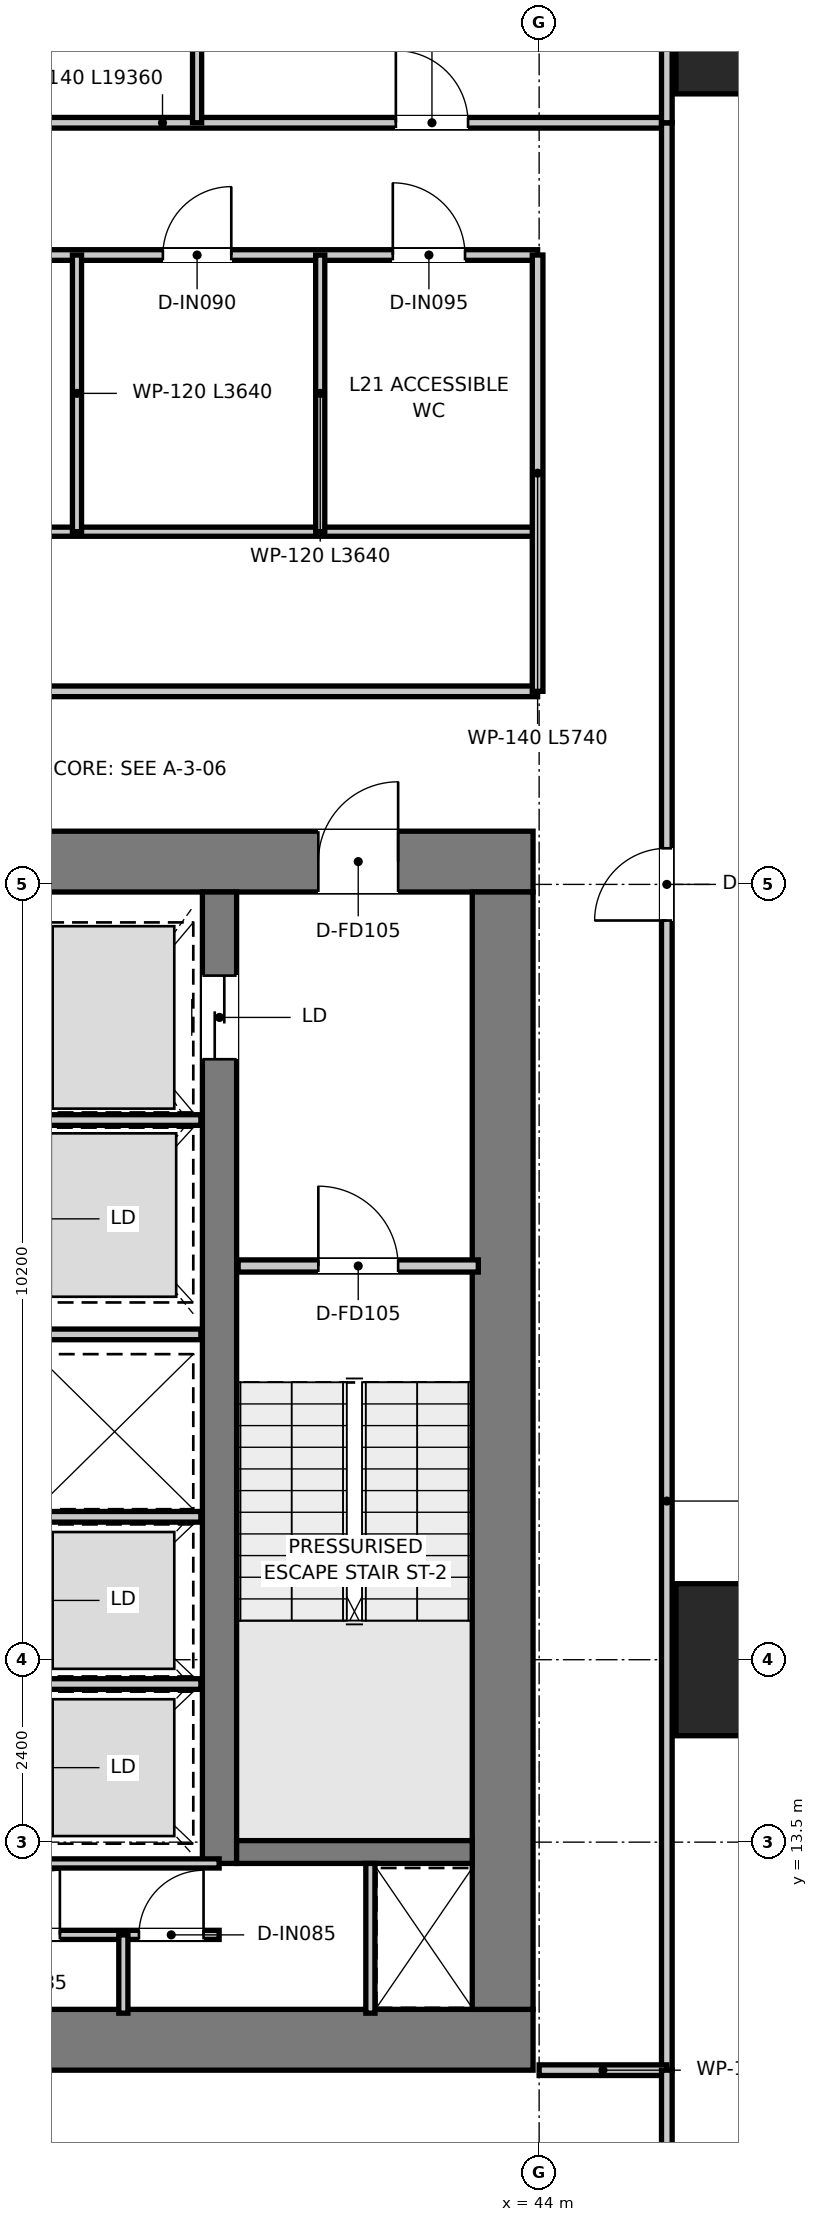
"""IFC4 building model, lengths in metres.
Left out: names, types, materials, properties, quantities, classifications, styles, units other than length and angle.
Written with IfcOpenShell. Run it as: python <this file> out.ifc"""

import sys

from ifc_helpers import new_model, si_unit, direction, frame, frame_2d, origin, origin_2d, place, context, subcontext, project, spatial, rectangle, extrude, source, transform, mapped, element, fill, save


model = new_model("IFC4")
c1 = context("Model", 3, precision=1e-05, world=origin(), true_north=direction((0.0, 1.0)))
c2 = subcontext(c1, "Body", "Model", "MODEL_VIEW")
j1 = project(units=[si_unit("LENGTHUNIT", "METRE"), si_unit("PLANEANGLEUNIT", "RADIAN")], contexts=[c1])
p1 = place(None, origin())
s1 = spatial("IfcSite", under=j1, at=p1, CompositionType="ELEMENT")
p2 = place(p1, origin())
s2 = spatial("IfcBuilding", under=s1, at=p2, CompositionType="ELEMENT")
p3 = place(p2, frame((0.0, 0.0, 90.05)))
s3 = spatial("IfcBuildingStorey", under=s2, at=p3, CompositionType="ELEMENT", Elevation=90.05)
p4 = place(p3, frame((28.08, 10.9, 0.0), z_axis=(0.0, 0.0, 1.0), x_axis=(1.0, 0.0, 0.0)))
e1 = element("IfcWall", 1, at=p4, inside=s3, PredefinedType="SHEAR", context=c2, shape_type="SweptSolid", body=[
    extrude(rectangle(XDim=15.84, YDim=0.8, at=frame_2d((7.92, 0.0))), origin(), (0.0, 0.0, 1.0), 3.95),
])
p5 = place(p3, frame((28.08, 26.4, 0.0), z_axis=(0.0, 0.0, 1.0), x_axis=(1.0, 0.0, 0.0)))
e2 = element("IfcWall", 2, at=p5, inside=s3, PredefinedType="SHEAR", context=c2, shape_type="SweptSolid", body=[
    extrude(rectangle(XDim=15.84, YDim=0.8, at=frame_2d((7.92, 0.0))), origin(), (0.0, 0.0, 1.0), 3.95),
])
p6 = place(p5, frame((7.22, 0.0, 0.0)))
e3 = element("IfcOpeningElement", 3, at=p6, cuts=e2, PredefinedType="OPENING", context=c2, shape_type="SweptSolid", body=[
    extrude(rectangle(XDim=1.4, YDim=2.2, at=frame_2d((0.7, 1.1))), frame((0.0, 0.41, 0.0), z_axis=(0.0, -1.0, 0.0), x_axis=(1.0, 0.0, 0.0)), (0.0, 0.0, 1.0), 0.82),
])
p7 = place(p5, frame((1.775, 0.0, 0.0)))
e4 = element("IfcOpeningElement", 4, at=p7, cuts=e2, PredefinedType="OPENING", context=c2, shape_type="SweptSolid", body=[
    extrude(rectangle(XDim=1.05, YDim=2.1, at=frame_2d((0.525, 1.05))), frame((0.0, 0.41, 0.0), z_axis=(0.0, -1.0, 0.0), x_axis=(1.0, 0.0, 0.0)), (0.0, 0.0, 1.0), 0.82),
])
p8 = place(p5, frame((13.015, 0.0, 0.0)))
e5 = element("IfcOpeningElement", 5, at=p8, cuts=e2, PredefinedType="OPENING", context=c2, shape_type="SweptSolid", body=[
    extrude(rectangle(XDim=1.05, YDim=2.1, at=frame_2d((0.525, 1.05))), frame((0.0, 0.41, 0.0), z_axis=(0.0, -1.0, 0.0), x_axis=(1.0, 0.0, 0.0)), (0.0, 0.0, 1.0), 0.82),
])
p9 = place(p3, frame((43.52, 11.3, 0.0), z_axis=(0.0, 0.0, 1.0), x_axis=(0.0, 1.0, 0.0)))
e6 = element("IfcWall", 6, at=p9, inside=s3, PredefinedType="SHEAR", context=c2, shape_type="SweptSolid", body=[
    extrude(rectangle(XDim=14.7, YDim=0.8, at=frame_2d((7.35, 0.0))), origin(), (0.0, 0.0, 1.0), 3.95),
])
p10 = place(p3, frame((39.795, 13.22, 0.0), z_axis=(0.0, 0.0, 1.0), x_axis=(0.0, 1.0, 0.0)))
e7 = element("IfcWall", 7, at=p10, inside=s3, PredefinedType="SHEAR", context=c2, shape_type="SweptSolid", body=[
    extrude(rectangle(XDim=12.78, YDim=0.45, at=frame_2d((6.39, 0.0))), origin(), (0.0, 0.0, 1.0), 3.95),
])
p11 = place(p10, frame((10.58, 0.0, 0.0)))
e8 = element("IfcOpeningElement", 8, at=p11, cuts=e7, PredefinedType="OPENING", context=c2, shape_type="SweptSolid", body=[
    extrude(rectangle(XDim=1.1, YDim=2.15, at=frame_2d((0.55, 1.075))), frame((0.0, 0.235, 0.0), z_axis=(0.0, -1.0, 0.0), x_axis=(1.0, 0.0, 0.0)), (0.0, 0.0, 1.0), 0.47),
])
p12 = place(p3, frame((40.02, 13.37, 0.0), z_axis=(0.0, 0.0, 1.0), x_axis=(1.0, 0.0, 0.0)))
e9 = element("IfcWall", 9, at=p12, inside=s3, PredefinedType="SHEAR", context=c2, shape_type="SweptSolid", body=[
    extrude(rectangle(XDim=3.1, YDim=0.3, at=frame_2d((1.55, 0.0))), origin(), (0.0, 0.0, 1.0), 3.95),
])
m1 = source(origin(), c2, "Body", "SweptSolid", [
    extrude(rectangle(XDim=2.0, YDim=2.0, at=origin_2d()), origin(), (0.0, 0.0, 1.0), 3.95),
])
for number, where, z_axis, x_axis in (
    (10, (46.8, 15.9, 0.0), (0.0, 0.0, 1.0), (1.0, 0.0, 0.0)),
    (11, (46.8, 37.5, 0.0), (0.0, 0.0, 1.0), (1.0, 0.0, 0.0)),
):
    element("IfcColumn", number, at=place(p3, frame(where, z_axis=z_axis, x_axis=x_axis)), inside=s3, PredefinedType="USERDEFINED", context=c2, shape_type="MappedRepresentation", body=[
        mapped(m1, transform((0.0, 0.0, 0.0), x_axis=(1.0, 0.0, 0.0), y_axis=(0.0, 1.0, 0.0), z_axis=(0.0, 0.0, 1.0), scale=1.0)),
    ])
p13 = place(p3, frame((40.04, 21.08, 0.0), z_axis=(0.0, 0.0, 1.0), x_axis=(1.0, 0.0, 0.0)))
e12 = element("IfcWall", 12, at=p13, inside=s3, PredefinedType="PARTITIONING", context=c2, shape_type="SweptSolid", body=[
    extrude(rectangle(XDim=3.16, YDim=0.16, at=frame_2d((1.58, 0.0))), origin(), (0.0, 0.0, 1.0), 3.67),
])
p14 = place(p13, frame((1.055, 0.0, 0.0)))
e13 = element("IfcOpeningElement", 13, at=p14, cuts=e12, PredefinedType="OPENING", context=c2, shape_type="SweptSolid", body=[
    extrude(rectangle(XDim=1.05, YDim=2.1, at=frame_2d((0.525, 1.05))), frame((0.0, 0.09, 0.0), z_axis=(0.0, -1.0, 0.0), x_axis=(1.0, 0.0, 0.0)), (0.0, 0.0, 1.0), 0.18),
])
p15 = place(p3, frame((37.28, 23.0, 0.0), z_axis=(0.0, 0.0, 1.0), x_axis=(1.0, 0.0, 0.0)))
e14 = element("IfcWall", 14, at=p15, inside=s3, PredefinedType="PARTITIONING", context=c2, shape_type="SweptSolid", body=[
    extrude(rectangle(XDim=2.27, YDim=0.14, at=frame_2d((1.135, 0.0))), origin(), (0.0, 0.0, 1.0), 2.47),
])
for number, where, z_axis, x_axis in (
    (15, (37.28, 17.78, 0.0), (0.0, 0.0, 1.0), (1.0, 0.0, 0.0)),
    (16, (37.28, 20.18, 0.0), (0.0, 0.0, 1.0), (1.0, 0.0, 0.0)),
    (17, (37.28, 15.58, 0.0), (0.0, 0.0, 1.0), (1.0, 0.0, 0.0)),
):
    element("IfcWall", number, at=place(p3, frame(where, z_axis=z_axis, x_axis=x_axis)), inside=s3, PredefinedType="PARTITIONING", context=c2, shape_type="SweptSolid", body=[
        extrude(rectangle(XDim=2.27, YDim=0.14, at=frame_2d((1.135, 0.0))), origin(), (0.0, 0.0, 1.0), 3.67),
    ])
p16 = place(p3, frame((41.78, 11.25, 0.0), z_axis=(0.0, 0.0, 1.0), x_axis=(0.0, 1.0, 0.0)))
e18 = element("IfcWall", 18, at=p16, inside=s3, PredefinedType="PARTITIONING", context=c2, shape_type="SweptSolid", body=[
    extrude(rectangle(XDim=1.97, YDim=0.12, at=frame_2d((0.985, 0.0))), origin(), (0.0, 0.0, 1.0), 3.67),
])
p17 = place(p3, frame((32.21, 13.22, 0.0), z_axis=(0.0, 0.0, 1.0), x_axis=(1.0, 0.0, 0.0)))
e19 = element("IfcWall", 19, at=p17, inside=s3, PredefinedType="PARTITIONING", context=c2, shape_type="SweptSolid", body=[
    extrude(rectangle(XDim=7.58, YDim=0.12, at=frame_2d((3.79, 0.0))), origin(), (0.0, 0.0, 1.0), 3.67),
])
p18 = place(p17, frame((3.365, 0.0, 0.0)))
e20 = element("IfcOpeningElement", 20, at=p18, cuts=e19, PredefinedType="OPENING", context=c2, shape_type="SweptSolid", body=[
    extrude(rectangle(XDim=0.85, YDim=2.1, at=frame_2d((0.425, 1.05))), frame((0.0, 0.07, 0.0), z_axis=(0.0, -1.0, 0.0), x_axis=(1.0, 0.0, 0.0)), (0.0, 0.0, 1.0), 0.14),
])
p19 = place(p3, frame((32.21, 12.28, 0.0), z_axis=(0.0, 0.0, 1.0), x_axis=(1.0, 0.0, 0.0)))
e21 = element("IfcWall", 21, at=p19, inside=s3, PredefinedType="PARTITIONING", context=c2, shape_type="SweptSolid", body=[
    extrude(rectangle(XDim=7.58, YDim=0.12, at=frame_2d((3.79, 0.0))), origin(), (0.0, 0.0, 1.0), 3.67),
])
p20 = place(p19, frame((0.205, 0.0, 0.0)))
e22 = element("IfcOpeningElement", 22, at=p20, cuts=e21, PredefinedType="OPENING", context=c2, shape_type="SweptSolid", body=[
    extrude(rectangle(XDim=0.85, YDim=2.1, at=frame_2d((0.425, 1.05))), frame((0.0, 0.07, 0.0), z_axis=(0.0, -1.0, 0.0), x_axis=(1.0, 0.0, 0.0)), (0.0, 0.0, 1.0), 0.14),
])
p21 = place(p19, frame((2.095, 0.0, 0.0)))
e23 = element("IfcOpeningElement", 23, at=p21, cuts=e21, PredefinedType="OPENING", context=c2, shape_type="SweptSolid", body=[
    extrude(rectangle(XDim=0.85, YDim=2.1, at=frame_2d((0.425, 1.05))), frame((0.0, 0.07, 0.0), z_axis=(0.0, -1.0, 0.0), x_axis=(1.0, 0.0, 0.0)), (0.0, 0.0, 1.0), 0.14),
])
p22 = place(p19, frame((4.635, 0.0, 0.0)))
e24 = element("IfcOpeningElement", 24, at=p22, cuts=e21, PredefinedType="OPENING", context=c2, shape_type="SweptSolid", body=[
    extrude(rectangle(XDim=0.85, YDim=2.1, at=frame_2d((0.425, 1.05))), frame((0.0, 0.07, 0.0), z_axis=(0.0, -1.0, 0.0), x_axis=(1.0, 0.0, 0.0)), (0.0, 0.0, 1.0), 0.14),
])
p23 = place(p19, frame((6.525, 0.0, 0.0)))
e25 = element("IfcOpeningElement", 25, at=p23, cuts=e21, PredefinedType="OPENING", context=c2, shape_type="SweptSolid", body=[
    extrude(rectangle(XDim=0.85, YDim=2.1, at=frame_2d((0.425, 1.05))), frame((0.0, 0.07, 0.0), z_axis=(0.0, -1.0, 0.0), x_axis=(1.0, 0.0, 0.0)), (0.0, 0.0, 1.0), 0.14),
])
p24 = place(p3, frame((38.53, 11.25, 0.0), z_axis=(0.0, 0.0, 1.0), x_axis=(0.0, 1.0, 0.0)))
e26 = element("IfcWall", 26, at=p24, inside=s3, PredefinedType="PARTITIONING", context=c2, shape_type="SweptSolid", body=[
    extrude(rectangle(XDim=1.03, YDim=0.12, at=frame_2d((0.515, 0.0))), origin(), (0.0, 0.0, 1.0), 3.67),
])
p25 = place(p3, frame((28.02, 28.64, 0.0), z_axis=(0.0, 0.0, 1.0), x_axis=(1.0, 0.0, 0.0)))
e27 = element("IfcWall", 27, at=p25, inside=s3, PredefinedType="PARTITIONING", context=c2, shape_type="SweptSolid", body=[
    extrude(rectangle(XDim=15.96, YDim=0.14, at=frame_2d((7.98, 0.0))), origin(), (0.0, 0.0, 1.0), 3.08),
])
p26 = place(p25, frame((7.455, 0.0, 0.0)))
e28 = element("IfcOpeningElement", 28, at=p26, cuts=e27, PredefinedType="OPENING", context=c2, shape_type="SweptSolid", body=[
    extrude(rectangle(XDim=1.05, YDim=2.15, at=frame_2d((0.525, 1.075))), frame((0.0, 0.08, 0.0), z_axis=(0.0, -1.0, 0.0), x_axis=(1.0, 0.0, 0.0)), (0.0, 0.0, 1.0), 0.16),
])
p27 = place(p3, frame((28.02, 30.74, 0.0), z_axis=(0.0, 0.0, 1.0), x_axis=(1.0, 0.0, 0.0)))
e29 = element("IfcWall", 29, at=p27, inside=s3, PredefinedType="PARTITIONING", context=c2, shape_type="SweptSolid", body=[
    extrude(rectangle(XDim=15.96, YDim=0.12, at=frame_2d((7.98, 0.0))), origin(), (0.0, 0.0, 1.0), 3.08),
])
p28 = place(p3, frame((28.02, 34.38, 0.0), z_axis=(0.0, 0.0, 1.0), x_axis=(1.0, 0.0, 0.0)))
e30 = element("IfcWall", 30, at=p28, inside=s3, PredefinedType="PARTITIONING", context=c2, shape_type="SweptSolid", body=[
    extrude(rectangle(XDim=15.96, YDim=0.14, at=frame_2d((7.98, 0.0))), origin(), (0.0, 0.0, 1.0), 3.08),
])
p29 = place(p28, frame((7.83, 0.0, 0.0)))
e31 = element("IfcOpeningElement", 31, at=p29, cuts=e30, PredefinedType="OPENING", context=c2, shape_type="SweptSolid", body=[
    extrude(rectangle(XDim=0.9, YDim=2.1, at=frame_2d((0.45, 1.05))), frame((0.0, 0.08, 0.0), z_axis=(0.0, -1.0, 0.0), x_axis=(1.0, 0.0, 0.0)), (0.0, 0.0, 1.0), 0.16),
])
p30 = place(p28, frame((11.03, 0.0, 0.0)))
e32 = element("IfcOpeningElement", 32, at=p30, cuts=e30, PredefinedType="OPENING", context=c2, shape_type="SweptSolid", body=[
    extrude(rectangle(XDim=0.9, YDim=2.1, at=frame_2d((0.45, 1.05))), frame((0.0, 0.08, 0.0), z_axis=(0.0, -1.0, 0.0), x_axis=(1.0, 0.0, 0.0)), (0.0, 0.0, 1.0), 0.16),
])
p31 = place(p28, frame((14.055, 0.0, 0.0)))
e33 = element("IfcOpeningElement", 33, at=p31, cuts=e30, PredefinedType="OPENING", context=c2, shape_type="SweptSolid", body=[
    extrude(rectangle(XDim=0.95, YDim=2.1, at=frame_2d((0.475, 1.05))), frame((0.0, 0.08, 0.0), z_axis=(0.0, -1.0, 0.0), x_axis=(1.0, 0.0, 0.0)), (0.0, 0.0, 1.0), 0.16),
])
p32 = place(p28, frame((2.855, 0.0, 0.0)))
e34 = element("IfcOpeningElement", 34, at=p32, cuts=e30, PredefinedType="OPENING", context=c2, shape_type="SweptSolid", body=[
    extrude(rectangle(XDim=0.95, YDim=2.1, at=frame_2d((0.475, 1.05))), frame((0.0, 0.08, 0.0), z_axis=(0.0, -1.0, 0.0), x_axis=(1.0, 0.0, 0.0)), (0.0, 0.0, 1.0), 0.16),
])
p33 = place(p3, frame((43.98, 28.64, 0.0), z_axis=(0.0, 0.0, 1.0), x_axis=(0.0, 1.0, 0.0)))
e35 = element("IfcWall", 35, at=p33, inside=s3, PredefinedType="PARTITIONING", context=c2, shape_type="SweptSolid", body=[
    extrude(rectangle(XDim=5.74, YDim=0.14, at=frame_2d((2.87, 0.0))), origin(), (0.0, 0.0, 1.0), 3.27),
])
for number, where, z_axis, x_axis in (
    (36, (37.92, 30.74, 0.0), (0.0, 0.0, 1.0), (0.0, 1.0, 0.0)),
    (37, (41.12, 30.74, 0.0), (0.0, 0.0, 1.0), (0.0, 1.0, 0.0)),
):
    element("IfcWall", number, at=place(p3, frame(where, z_axis=z_axis, x_axis=x_axis)), inside=s3, PredefinedType="PARTITIONING", context=c2, shape_type="SweptSolid", body=[
        extrude(rectangle(XDim=3.64, YDim=0.12, at=frame_2d((1.82, 0.0))), origin(), (0.0, 0.0, 1.0), 3.17),
    ])
p34 = place(p3, frame((26.32, 36.12, 0.0), z_axis=(0.0, 0.0, 1.0), x_axis=(1.0, 0.0, 0.0)))
e38 = element("IfcWall", 38, at=p34, inside=s3, PredefinedType="PARTITIONING", context=c2, shape_type="SweptSolid", body=[
    extrude(rectangle(XDim=19.36, YDim=0.14, at=frame_2d((9.68, 0.0))), origin(), (0.0, 0.0, 1.0), 3.08),
])
p35 = place(p34, frame((2.115, 0.0, 0.0)))
e39 = element("IfcOpeningElement", 39, at=p35, cuts=e38, PredefinedType="OPENING", context=c2, shape_type="SweptSolid", body=[
    extrude(rectangle(XDim=0.95, YDim=2.1, at=frame_2d((0.475, 1.05))), frame((0.0, 0.08, 0.0), z_axis=(0.0, -1.0, 0.0), x_axis=(1.0, 0.0, 0.0)), (0.0, 0.0, 1.0), 0.16),
])
p36 = place(p34, frame((8.705, 0.0, 0.0)))
e40 = element("IfcOpeningElement", 40, at=p36, cuts=e38, PredefinedType="OPENING", context=c2, shape_type="SweptSolid", body=[
    extrude(rectangle(XDim=0.95, YDim=2.1, at=frame_2d((0.475, 1.05))), frame((0.0, 0.08, 0.0), z_axis=(0.0, -1.0, 0.0), x_axis=(1.0, 0.0, 0.0)), (0.0, 0.0, 1.0), 0.16),
])
p37 = place(p34, frame((15.795, 0.0, 0.0)))
e41 = element("IfcOpeningElement", 41, at=p37, cuts=e38, PredefinedType="OPENING", context=c2, shape_type="SweptSolid", body=[
    extrude(rectangle(XDim=0.95, YDim=2.1, at=frame_2d((0.475, 1.05))), frame((0.0, 0.08, 0.0), z_axis=(0.0, -1.0, 0.0), x_axis=(1.0, 0.0, 0.0)), (0.0, 0.0, 1.0), 0.16),
])
p38 = place(p3, frame((45.68, 10.5, 0.0), z_axis=(0.0, 0.0, 1.0), x_axis=(0.0, 1.0, 0.0)))
e42 = element("IfcWall", 42, at=p38, inside=s3, PredefinedType="PARTITIONING", context=c2, shape_type="SweptSolid", body=[
    extrude(rectangle(XDim=25.62, YDim=0.14, at=frame_2d((12.81, 0.0))), origin(), (0.0, 0.0, 1.0), 2.97),
])
p39 = place(p38, frame((15.125, 0.0, 0.0)))
e43 = element("IfcOpeningElement", 43, at=p39, cuts=e42, PredefinedType="OPENING", context=c2, shape_type="SweptSolid", body=[
    extrude(rectangle(XDim=0.95, YDim=2.1, at=frame_2d((0.475, 1.05))), frame((0.0, 0.08, 0.0), z_axis=(0.0, -1.0, 0.0), x_axis=(1.0, 0.0, 0.0)), (0.0, 0.0, 1.0), 0.16),
])
p40 = place(p3, frame((44.0, 10.5, 0.0), z_axis=(0.0, 0.0, 1.0), x_axis=(1.0, 0.0, 0.0)))
e44 = element("IfcWall", 44, at=p40, inside=s3, PredefinedType="PARTITIONING", context=c2, shape_type="SweptSolid", body=[
    extrude(rectangle(XDim=1.68, YDim=0.14, at=frame_2d((0.84, 0.0))), origin(), (0.0, 0.0, 1.0), 3.67),
])
p41 = place(p3, frame((45.68, 36.12, 0.0), z_axis=(0.0, 0.0, 1.0), x_axis=(0.0, 1.0, 0.0)))
e45 = element("IfcWall", 45, at=p41, inside=s3, PredefinedType="PARTITIONING", context=c2, shape_type="SweptSolid", body=[
    extrude(rectangle(XDim=12.289, YDim=0.14, at=frame_2d((6.145, 0.0))), origin(), (0.0, 0.0, 1.0), 2.97),
])
p42 = place(p3, frame((45.68, 0.61, 0.0), z_axis=(0.0, 0.0, 1.0), x_axis=(0.0, 1.0, 0.0)))
e46 = element("IfcWall", 46, at=p42, inside=s3, PredefinedType="PARTITIONING", context=c2, shape_type="SweptSolid", body=[
    extrude(rectangle(XDim=9.89, YDim=0.14, at=frame_2d((4.945, 0.0))), origin(), (0.0, 0.0, 1.0), 3.67),
])
p43 = place(p3, frame((39.5, 36.12, 0.0), z_axis=(0.0, 0.0, 1.0), x_axis=(0.0, 1.0, 0.0)))
e47 = element("IfcWall", 47, at=p43, inside=s3, PredefinedType="PARTITIONING", context=c2, shape_type="SweptSolid", body=[
    extrude(rectangle(XDim=13.687, YDim=0.12, at=frame_2d((6.844, 0.0))), origin(), (0.0, 0.0, 1.0), 2.97),
])
p44 = place(p14, origin())
e48 = element("IfcDoor", 48, at=p44, inside=s3, OperationType="SINGLE_SWING_LEFT", PredefinedType="DOOR", context=c2, shape_type="SweptSolid", body=[
    extrude(rectangle(XDim=1.05, YDim=2.1, at=frame_2d((0.525, 1.05))), frame((0.0, 0.025, 0.0), z_axis=(0.0, -1.0, 0.0), x_axis=(1.0, 0.0, 0.0)), (0.0, 0.0, 1.0), 0.05),
])
fill(e13, e48)
p45 = place(p8, origin())
e49 = element("IfcDoor", 49, at=p45, inside=s3, OperationType="SINGLE_SWING_RIGHT", PredefinedType="DOOR", context=c2, shape_type="SweptSolid", body=[
    extrude(rectangle(XDim=1.05, YDim=2.1, at=frame_2d((0.525, 1.05))), frame((0.0, 0.025, 0.0), z_axis=(0.0, -1.0, 0.0), x_axis=(1.0, 0.0, 0.0)), (0.0, 0.0, 1.0), 0.05),
])
fill(e5, e49)
p46 = place(p11, origin())
e50 = element("IfcDoor", 50, at=p46, inside=s3, OperationType="DOUBLE_DOOR_SLIDING", PredefinedType="DOOR", context=c2, shape_type="SweptSolid", body=[
    extrude(rectangle(XDim=1.1, YDim=2.15, at=frame_2d((0.55, 1.075))), frame((0.0, 0.025, 0.0), z_axis=(0.0, -1.0, 0.0), x_axis=(1.0, 0.0, 0.0)), (0.0, 0.0, 1.0), 0.05),
])
fill(e8, e50)
p47 = place(p22, origin())
e51 = element("IfcDoor", 51, at=p47, inside=s3, OperationType="SINGLE_SWING_RIGHT", PredefinedType="DOOR", context=c2, shape_type="SweptSolid", body=[
    extrude(rectangle(XDim=0.85, YDim=2.1, at=frame_2d((0.425, 1.05))), frame((0.0, 0.025, 0.0), z_axis=(0.0, -1.0, 0.0), x_axis=(1.0, 0.0, 0.0)), (0.0, 0.0, 1.0), 0.05),
])
fill(e24, e51)
p48 = place(p23, origin())
e52 = element("IfcDoor", 52, at=p48, inside=s3, OperationType="SINGLE_SWING_RIGHT", PredefinedType="DOOR", context=c2, shape_type="SweptSolid", body=[
    extrude(rectangle(XDim=0.85, YDim=2.1, at=frame_2d((0.425, 1.05))), frame((0.0, 0.025, 0.0), z_axis=(0.0, -1.0, 0.0), x_axis=(1.0, 0.0, 0.0)), (0.0, 0.0, 1.0), 0.05),
])
fill(e25, e52)
p49 = place(p30, origin())
e53 = element("IfcDoor", 53, at=p49, inside=s3, OperationType="SINGLE_SWING_RIGHT", PredefinedType="DOOR", context=c2, shape_type="SweptSolid", body=[
    extrude(rectangle(XDim=0.9, YDim=2.1, at=frame_2d((0.45, 1.05))), frame((0.0, 0.025, 0.0), z_axis=(0.0, -1.0, 0.0), x_axis=(1.0, 0.0, 0.0)), (0.0, 0.0, 1.0), 0.05),
])
fill(e32, e53)
p50 = place(p31, origin())
e54 = element("IfcDoor", 54, at=p50, inside=s3, OperationType="SINGLE_SWING_LEFT", PredefinedType="DOOR", context=c2, shape_type="SweptSolid", body=[
    extrude(rectangle(XDim=0.95, YDim=2.1, at=frame_2d((0.475, 1.05))), frame((0.0, 0.025, 0.0), z_axis=(0.0, -1.0, 0.0), x_axis=(1.0, 0.0, 0.0)), (0.0, 0.0, 1.0), 0.05),
])
fill(e33, e54)
p51 = place(p37, origin())
e55 = element("IfcDoor", 55, at=p51, inside=s3, OperationType="SINGLE_SWING_LEFT", PredefinedType="DOOR", context=c2, shape_type="SweptSolid", body=[
    extrude(rectangle(XDim=0.95, YDim=2.1, at=frame_2d((0.475, 1.05))), frame((0.0, 0.025, 0.0), z_axis=(0.0, -1.0, 0.0), x_axis=(1.0, 0.0, 0.0)), (0.0, 0.0, 1.0), 0.05),
])
fill(e41, e55)
p52 = place(p39, origin())
e56 = element("IfcDoor", 56, at=p52, inside=s3, OperationType="SINGLE_SWING_LEFT", PredefinedType="DOOR", context=c2, shape_type="SweptSolid", body=[
    extrude(rectangle(XDim=0.95, YDim=2.1, at=frame_2d((0.475, 1.05))), frame((0.0, 0.025, 0.0), z_axis=(0.0, -1.0, 0.0), x_axis=(1.0, 0.0, 0.0)), (0.0, 0.0, 1.0), 0.05),
])
fill(e43, e56)
save(model, sys.argv[1])
